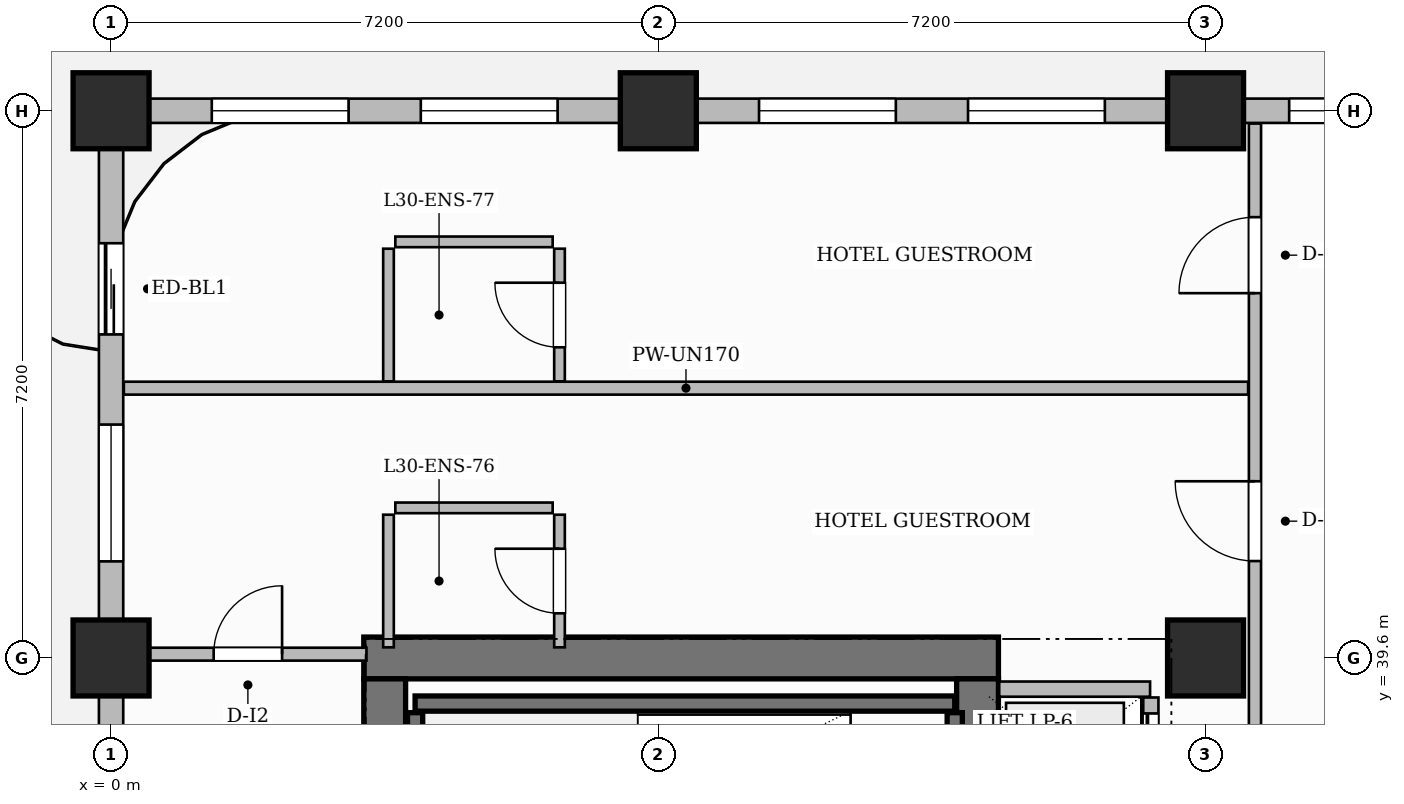
"""IFC4 building model, lengths in metres.
Left out: names, types, materials, properties, quantities, classifications, styles, units other than length and angle.
Written with IfcOpenShell. Run it as: python <this file> out.ifc"""

import sys

from ifc_helpers import new_model, si_unit, direction, frame, frame_2d, origin, origin_2d, place, context, subcontext, project, spatial, rectangle, extrude, source, transform, mapped, element, fill, save


model = new_model("IFC4")
c1 = context("Model", 3, precision=1e-05, world=origin(), true_north=direction((0.0, 1.0)))
c2 = subcontext(c1, "Body", "Model", "MODEL_VIEW")
j1 = project(units=[si_unit("LENGTHUNIT", "METRE"), si_unit("PLANEANGLEUNIT", "RADIAN")], contexts=[c1])
p1 = place(None, origin())
s1 = spatial("IfcSite", under=j1, at=p1, CompositionType="ELEMENT")
p2 = place(p1, origin())
s2 = spatial("IfcBuilding", under=s1, at=p2, CompositionType="ELEMENT")
p3 = place(p2, frame((0.0, 0.0, 122.9)))
s3 = spatial("IfcBuildingStorey", under=s2, at=p3, CompositionType="ELEMENT", Elevation=122.9)
p4 = place(p3, frame((3.325, 39.6, 0.0), z_axis=(0.0, 0.0, 1.0), x_axis=(1.0, 0.0, 0.0)))
e1 = element("IfcWall", 1, at=p4, inside=s3, PredefinedType="SHEAR", context=c2, shape_type="SweptSolid", body=[
    extrude(rectangle(XDim=8.35, YDim=0.55, at=frame_2d((4.175, 0.0))), origin(), (0.0, 0.0, 1.0), 3.7),
])
p5 = place(p3, frame((3.6, 25.475, 0.0), z_axis=(0.0, 0.0, 1.0), x_axis=(0.0, 1.0, 0.0)))
e2 = element("IfcWall", 2, at=p5, inside=s3, PredefinedType="SHEAR", context=c2, shape_type="SweptSolid", body=[
    extrude(rectangle(XDim=13.85, YDim=0.55, at=frame_2d((6.925, 0.0))), origin(), (0.0, 0.0, 1.0), 3.7),
])
p6 = place(p3, frame((11.4, 25.475, 0.0), z_axis=(0.0, 0.0, 1.0), x_axis=(0.0, 1.0, 0.0)))
e3 = element("IfcWall", 3, at=p6, inside=s3, PredefinedType="SHEAR", context=c2, shape_type="SweptSolid", body=[
    extrude(rectangle(XDim=13.85, YDim=0.55, at=frame_2d((6.925, 0.0))), origin(), (0.0, 0.0, 1.0), 3.7),
])
p7 = place(p6, frame((6.495, 0.0, 0.0)))
e4 = element("IfcOpeningElement", 4, at=p7, cuts=e3, PredefinedType="OPENING", context=c2, shape_type="SweptSolid", body=[
    extrude(rectangle(XDim=1.5, YDim=2.2, at=frame_2d((0.75, 1.1))), frame((0.0, 0.285, 0.0), z_axis=(0.0, -1.0, 0.0), x_axis=(1.0, 0.0, 0.0)), (0.0, 0.0, 1.0), 0.57),
])
m1 = source(origin(), c2, "Body", "SweptSolid", [
    extrude(rectangle(XDim=1.0, YDim=1.0, at=origin_2d()), origin(), (0.0, 0.0, 1.0), 3.7),
])
for number, where, z_axis, x_axis in (
    (5, (0.0, 39.6, 0.0), (0.0, 0.0, 1.0), (1.0, 0.0, 0.0)),
    (6, (0.0, 46.8, 0.0), (0.0, 0.0, 1.0), (1.0, 0.0, 0.0)),
    (7, (7.2, 46.8, 0.0), (0.0, 0.0, 1.0), (1.0, 0.0, 0.0)),
    (8, (14.4, 39.6, 0.0), (0.0, 0.0, 1.0), (1.0, 0.0, 0.0)),
    (9, (14.4, 46.8, 0.0), (0.0, 0.0, 1.0), (1.0, 0.0, 0.0)),
):
    element("IfcColumn", number, at=place(p3, frame(where, z_axis=z_axis, x_axis=x_axis)), inside=s3, PredefinedType="COLUMN", context=c2, shape_type="MappedRepresentation", body=[
        mapped(m1, transform((0.0, 0.0, 0.0), scale=1.0)),
    ])
p8 = place(p3, frame((4.0, 39.0, 0.0), z_axis=(0.0, 0.0, 1.0), x_axis=(1.0, 0.0, 0.0)))
e10 = element("IfcWall", 10, at=p8, inside=s3, PredefinedType="SHEAR", context=c2, shape_type="SweptSolid", body=[
    extrude(rectangle(XDim=7.1, YDim=0.2, at=frame_2d((3.55, 0.0))), origin(), (0.0, 0.0, 1.0), 3.7),
])
for number, where, z_axis, x_axis in (
    (11, (4.0, 36.18, 0.0), (0.0, 0.0, 1.0), (0.0, 1.0, 0.0)),
    (12, (11.1, 36.18, 0.0), (0.0, 0.0, 1.0), (0.0, 1.0, 0.0)),
):
    element("IfcWall", number, at=place(p3, frame(where, z_axis=z_axis, x_axis=x_axis)), inside=s3, PredefinedType="SHEAR", context=c2, shape_type="SweptSolid", body=[
        extrude(rectangle(XDim=2.7, YDim=0.2, at=frame_2d((1.35, 0.0))), origin(), (0.0, 0.0, 1.0), 3.7),
    ])
p9 = place(p3, frame((11.685, 39.19, 0.0), z_axis=(0.0, 0.0, 1.0), x_axis=(1.0, 0.0, 0.0)))
e13 = element("IfcWall", 13, at=p9, inside=s3, PredefinedType="PARTITIONING", context=c2, shape_type="SweptSolid", body=[
    extrude(rectangle(XDim=1.985, YDim=0.2, at=frame_2d((0.992, 0.0))), origin(), (0.0, 0.0, 1.0), 3.45),
])
p10 = place(p3, frame((13.68, 34.36, 0.0), z_axis=(0.0, 0.0, 1.0), x_axis=(0.0, 1.0, 0.0)))
e14 = element("IfcWall", 14, at=p10, inside=s3, PredefinedType="PARTITIONING", context=c2, shape_type="SweptSolid", body=[
    extrude(rectangle(XDim=4.72, YDim=0.2, at=frame_2d((2.36, 0.0))), origin(), (0.0, 0.0, 1.0), 3.45),
])
p11 = place(p10, frame((0.21, 0.0, 0.0)))
e15 = element("IfcOpeningElement", 15, at=p11, cuts=e14, PredefinedType="OPENING", context=c2, shape_type="SweptSolid", body=[
    extrude(rectangle(XDim=1.1, YDim=2.2, at=frame_2d((0.55, 1.1))), frame((0.0, 0.11, 0.0), z_axis=(0.0, -1.0, 0.0), x_axis=(1.0, 0.0, 0.0)), (0.0, 0.0, 1.0), 0.22),
])
p12 = place(p10, frame((1.81, 0.0, 0.0)))
e16 = element("IfcOpeningElement", 16, at=p12, cuts=e14, PredefinedType="OPENING", context=c2, shape_type="SweptSolid", body=[
    extrude(rectangle(XDim=1.1, YDim=2.2, at=frame_2d((0.55, 1.1))), frame((0.0, 0.11, 0.0), z_axis=(0.0, -1.0, 0.0), x_axis=(1.0, 0.0, 0.0)), (0.0, 0.0, 1.0), 0.22),
])
p13 = place(p10, frame((3.41, 0.0, 0.0)))
e17 = element("IfcOpeningElement", 17, at=p13, cuts=e14, PredefinedType="OPENING", context=c2, shape_type="SweptSolid", body=[
    extrude(rectangle(XDim=1.1, YDim=2.2, at=frame_2d((0.55, 1.1))), frame((0.0, 0.11, 0.0), z_axis=(0.0, -1.0, 0.0), x_axis=(1.0, 0.0, 0.0)), (0.0, 0.0, 1.0), 0.22),
])
p14 = place(p3, frame((0.24, 39.65, 0.0), z_axis=(0.0, 0.0, 1.0), x_axis=(1.0, 0.0, 0.0)))
e18 = element("IfcWall", 18, at=p14, inside=s3, PredefinedType="PARTITIONING", context=c2, shape_type="SweptSolid", body=[
    extrude(rectangle(XDim=3.12, YDim=0.17, at=frame_2d((1.56, 0.0))), origin(), (0.0, 0.0, 1.0), 3.45),
])
p15 = place(p14, frame((1.11, 0.0, 0.0)))
e19 = element("IfcOpeningElement", 19, at=p15, cuts=e18, PredefinedType="OPENING", context=c2, shape_type="SweptSolid", body=[
    extrude(rectangle(XDim=0.9, YDim=2.15, at=frame_2d((0.45, 1.075))), frame((0.0, 0.095, 0.0), z_axis=(0.0, -1.0, 0.0), x_axis=(1.0, 0.0, 0.0)), (0.0, 0.0, 1.0), 0.19),
])
p16 = place(p3, frame((15.05, 34.34, 0.0), z_axis=(0.0, 0.0, 1.0), x_axis=(0.0, 1.0, 0.0)))
e20 = element("IfcWall", 20, at=p16, inside=s3, PredefinedType="PARTITIONING", context=c2, shape_type="SweptSolid", body=[
    extrude(rectangle(XDim=12.292, YDim=0.16, at=frame_2d((6.146, 0.0))), origin(), (0.0, 0.0, 1.0), 3.45),
])
p17 = place(p16, frame((6.535, 0.0, 0.0)))
e21 = element("IfcOpeningElement", 21, at=p17, cuts=e20, PredefinedType="OPENING", context=c2, shape_type="SweptSolid", body=[
    extrude(rectangle(XDim=1.05, YDim=2.25, at=frame_2d((0.525, 1.125))), frame((0.0, 0.09, 0.0), z_axis=(0.0, -1.0, 0.0), x_axis=(1.0, 0.0, 0.0)), (0.0, 0.0, 1.0), 0.18),
])
p18 = place(p16, frame((10.06, 0.0, 0.0)))
e22 = element("IfcOpeningElement", 22, at=p18, cuts=e20, PredefinedType="OPENING", context=c2, shape_type="SweptSolid", body=[
    extrude(rectangle(XDim=1.0, YDim=2.2, at=frame_2d((0.5, 1.1))), frame((0.0, 0.09, 0.0), z_axis=(0.0, -1.0, 0.0), x_axis=(1.0, 0.0, 0.0)), (0.0, 0.0, 1.0), 0.18),
])
p19 = place(p3, frame((0.168, 43.15, 0.0), z_axis=(0.0, 0.0, 1.0), x_axis=(1.0, 0.0, 0.0)))
e23 = element("IfcWall", 23, at=p19, inside=s3, PredefinedType="PARTITIONING", context=c2, shape_type="SweptSolid", body=[
    extrude(rectangle(XDim=14.792, YDim=0.17, at=frame_2d((7.396, 0.0))), origin(), (0.0, 0.0, 1.0), 3.45),
])
p20 = place(p3, frame((3.65, 39.74, 0.0), z_axis=(0.0, 0.0, 1.0), x_axis=(0.0, 1.0, 0.0)))
e24 = element("IfcWall", 24, at=p20, inside=s3, PredefinedType="PARTITIONING", context=c2, shape_type="SweptSolid", body=[
    extrude(rectangle(XDim=1.745, YDim=0.14, at=frame_2d((0.873, 0.0))), origin(), (0.0, 0.0, 1.0), 3.45),
])
p21 = place(p3, frame((3.74, 41.575, 0.0), z_axis=(0.0, 0.0, 1.0), x_axis=(1.0, 0.0, 0.0)))
e25 = element("IfcWall", 25, at=p21, inside=s3, PredefinedType="PARTITIONING", context=c2, shape_type="SweptSolid", body=[
    extrude(rectangle(XDim=2.07, YDim=0.14, at=frame_2d((1.035, 0.0))), origin(), (0.0, 0.0, 1.0), 2.935),
])
p22 = place(p3, frame((5.9, 39.74, 0.0), z_axis=(0.0, 0.0, 1.0), x_axis=(0.0, 1.0, 0.0)))
e26 = element("IfcWall", 26, at=p22, inside=s3, PredefinedType="PARTITIONING", context=c2, shape_type="SweptSolid", body=[
    extrude(rectangle(XDim=1.745, YDim=0.14, at=frame_2d((0.873, 0.0))), origin(), (0.0, 0.0, 1.0), 3.45),
])
p23 = place(p22, frame((0.448, 0.0, 0.0)))
e27 = element("IfcOpeningElement", 27, at=p23, cuts=e26, PredefinedType="OPENING", context=c2, shape_type="SweptSolid", body=[
    extrude(rectangle(XDim=0.85, YDim=2.1, at=frame_2d((0.425, 1.05))), frame((0.0, 0.08, 0.0), z_axis=(0.0, -1.0, 0.0), x_axis=(1.0, 0.0, 0.0)), (0.0, 0.0, 1.0), 0.16),
])
p24 = place(p3, frame((3.65, 43.24, 0.0), z_axis=(0.0, 0.0, 1.0), x_axis=(0.0, 1.0, 0.0)))
e28 = element("IfcWall", 28, at=p24, inside=s3, PredefinedType="PARTITIONING", context=c2, shape_type="SweptSolid", body=[
    extrude(rectangle(XDim=1.745, YDim=0.14, at=frame_2d((0.873, 0.0))), origin(), (0.0, 0.0, 1.0), 3.45),
])
p25 = place(p3, frame((3.74, 45.075, 0.0), z_axis=(0.0, 0.0, 1.0), x_axis=(1.0, 0.0, 0.0)))
e29 = element("IfcWall", 29, at=p25, inside=s3, PredefinedType="PARTITIONING", context=c2, shape_type="SweptSolid", body=[
    extrude(rectangle(XDim=2.07, YDim=0.14, at=frame_2d((1.035, 0.0))), origin(), (0.0, 0.0, 1.0), 3.45),
])
p26 = place(p3, frame((5.9, 43.24, 0.0), z_axis=(0.0, 0.0, 1.0), x_axis=(0.0, 1.0, 0.0)))
e30 = element("IfcWall", 30, at=p26, inside=s3, PredefinedType="PARTITIONING", context=c2, shape_type="SweptSolid", body=[
    extrude(rectangle(XDim=1.745, YDim=0.14, at=frame_2d((0.873, 0.0))), origin(), (0.0, 0.0, 1.0), 3.45),
])
p27 = place(p26, frame((0.448, 0.0, 0.0)))
e31 = element("IfcOpeningElement", 31, at=p27, cuts=e30, PredefinedType="OPENING", context=c2, shape_type="SweptSolid", body=[
    extrude(rectangle(XDim=0.85, YDim=2.1, at=frame_2d((0.425, 1.05))), frame((0.0, 0.08, 0.0), z_axis=(0.0, -1.0, 0.0), x_axis=(1.0, 0.0, 0.0)), (0.0, 0.0, 1.0), 0.16),
])
p28 = place(p3, frame((0.0, 25.25, 0.0), z_axis=(0.0, 0.0, 1.0), x_axis=(0.0, 1.0, 0.0)))
e32 = element("IfcWall", 32, at=p28, inside=s3, PredefinedType="SOLIDWALL", context=c2, shape_type="SweptSolid", body=[
    extrude(rectangle(XDim=21.5, YDim=0.32, at=frame_2d((10.75, 0.0))), origin(), (0.0, 0.0, 1.0), 2.935),
])
p29 = place(p28, frame((18.607, 0.0, 0.0)))
e33 = element("IfcOpeningElement", 33, at=p29, cuts=e32, PredefinedType="OPENING", context=c2, shape_type="SweptSolid", body=[
    extrude(rectangle(XDim=1.2, YDim=2.2, at=frame_2d((0.6, 1.1))), frame((0.0, 0.17, 0.0), z_axis=(0.0, -1.0, 0.0), x_axis=(1.0, 0.0, 0.0)), (0.0, 0.0, 1.0), 0.34),
])
p30 = place(p28, frame((0.8, 0.0, 0.0)))
e34 = element("IfcOpeningElement", 34, at=p30, cuts=e32, PredefinedType="OPENING", context=c2, shape_type="SweptSolid", body=[
    extrude(rectangle(XDim=1.2, YDim=2.2, at=frame_2d((0.6, 1.1))), frame((0.0, 0.17, 0.0), z_axis=(0.0, -1.0, 0.0), x_axis=(1.0, 0.0, 0.0)), (0.0, 0.0, 1.0), 0.34),
])
p31 = place(p28, frame((3.425, 0.0, 0.8)))
e35 = element("IfcOpeningElement", 35, at=p31, cuts=e32, PredefinedType="OPENING", context=c2, shape_type="SweptSolid", body=[
    extrude(rectangle(XDim=1.8, YDim=1.85, at=frame_2d((0.9, 0.925))), frame((0.0, 0.17, 0.0), z_axis=(0.0, -1.0, 0.0), x_axis=(1.0, 0.0, 0.0)), (0.0, 0.0, 1.0), 0.34),
])
p32 = place(p28, frame((8.475, 0.0, 0.8)))
e36 = element("IfcOpeningElement", 36, at=p32, cuts=e32, PredefinedType="OPENING", context=c2, shape_type="SweptSolid", body=[
    extrude(rectangle(XDim=1.8, YDim=1.85, at=frame_2d((0.9, 0.925))), frame((0.0, 0.17, 0.0), z_axis=(0.0, -1.0, 0.0), x_axis=(1.0, 0.0, 0.0)), (0.0, 0.0, 1.0), 0.34),
])
p33 = place(p28, frame((11.225, 0.0, 0.8)))
e37 = element("IfcOpeningElement", 37, at=p33, cuts=e32, PredefinedType="OPENING", context=c2, shape_type="SweptSolid", body=[
    extrude(rectangle(XDim=1.8, YDim=1.85, at=frame_2d((0.9, 0.925))), frame((0.0, 0.17, 0.0), z_axis=(0.0, -1.0, 0.0), x_axis=(1.0, 0.0, 0.0)), (0.0, 0.0, 1.0), 0.34),
])
p34 = place(p28, frame((15.621, 0.0, 0.8)))
e38 = element("IfcOpeningElement", 38, at=p34, cuts=e32, PredefinedType="OPENING", context=c2, shape_type="SweptSolid", body=[
    extrude(rectangle(XDim=1.8, YDim=1.85, at=frame_2d((0.9, 0.925))), frame((0.0, 0.17, 0.0), z_axis=(0.0, -1.0, 0.0), x_axis=(1.0, 0.0, 0.0)), (0.0, 0.0, 1.0), 0.34),
])
p35 = place(p3, frame((0.0, 46.8, 0.0), z_axis=(0.0, 0.0, 1.0), x_axis=(1.0, 0.0, 0.0)))
e39 = element("IfcWall", 39, at=p35, inside=s3, PredefinedType="SOLIDWALL", context=c2, shape_type="SweptSolid", body=[
    extrude(rectangle(XDim=18.0, YDim=0.32, at=frame_2d((9.0, 0.0))), origin(), (0.0, 0.0, 1.0), 2.935),
])
p36 = place(p35, frame((1.325, 0.0, 0.8)))
e40 = element("IfcOpeningElement", 40, at=p36, cuts=e39, PredefinedType="OPENING", context=c2, shape_type="SweptSolid", body=[
    extrude(rectangle(XDim=1.8, YDim=1.85, at=frame_2d((0.9, 0.925))), frame((0.0, 0.17, 0.0), z_axis=(0.0, -1.0, 0.0), x_axis=(1.0, 0.0, 0.0)), (0.0, 0.0, 1.0), 0.34),
])
p37 = place(p35, frame((4.075, 0.0, 0.8)))
e41 = element("IfcOpeningElement", 41, at=p37, cuts=e39, PredefinedType="OPENING", context=c2, shape_type="SweptSolid", body=[
    extrude(rectangle(XDim=1.8, YDim=1.85, at=frame_2d((0.9, 0.925))), frame((0.0, 0.17, 0.0), z_axis=(0.0, -1.0, 0.0), x_axis=(1.0, 0.0, 0.0)), (0.0, 0.0, 1.0), 0.34),
])
p38 = place(p35, frame((8.525, 0.0, 0.8)))
e42 = element("IfcOpeningElement", 42, at=p38, cuts=e39, PredefinedType="OPENING", context=c2, shape_type="SweptSolid", body=[
    extrude(rectangle(XDim=1.8, YDim=1.85, at=frame_2d((0.9, 0.925))), frame((0.0, 0.17, 0.0), z_axis=(0.0, -1.0, 0.0), x_axis=(1.0, 0.0, 0.0)), (0.0, 0.0, 1.0), 0.34),
])
p39 = place(p35, frame((11.275, 0.0, 0.8)))
e43 = element("IfcOpeningElement", 43, at=p39, cuts=e39, PredefinedType="OPENING", context=c2, shape_type="SweptSolid", body=[
    extrude(rectangle(XDim=1.8, YDim=1.85, at=frame_2d((0.9, 0.925))), frame((0.0, 0.17, 0.0), z_axis=(0.0, -1.0, 0.0), x_axis=(1.0, 0.0, 0.0)), (0.0, 0.0, 1.0), 0.34),
])
p40 = place(p35, frame((15.5, 0.0, 0.8)))
e44 = element("IfcOpeningElement", 44, at=p40, cuts=e39, PredefinedType="OPENING", context=c2, shape_type="SweptSolid", body=[
    extrude(rectangle(XDim=1.4, YDim=1.85, at=frame_2d((0.7, 0.925))), frame((0.0, 0.17, 0.0), z_axis=(0.0, -1.0, 0.0), x_axis=(1.0, 0.0, 0.0)), (0.0, 0.0, 1.0), 0.34),
])
m2 = source(origin(), c2, "Body", "SweptSolid", [
    extrude(rectangle(XDim=0.9, YDim=2.15, at=frame_2d((0.45, 1.075))), frame((0.0, 0.025, 0.0), z_axis=(0.0, -1.0, 0.0), x_axis=(1.0, 0.0, 0.0)), (0.0, 0.0, 1.0), 0.05),
])
p41 = place(p15, origin())
e45 = element("IfcDoor", 45, at=p41, inside=s3, OperationType="SINGLE_SWING_RIGHT", PredefinedType="DOOR", context=c2, shape_type="MappedRepresentation", body=[
    mapped(m2, transform((0.0, 0.0, 0.0), scale=1.0)),
])
fill(e19, e45)
m3 = source(origin(), c2, "Body", "SweptSolid", [
    extrude(rectangle(XDim=0.85, YDim=2.1, at=frame_2d((0.425, 1.05))), frame((0.0, 0.025, 0.0), z_axis=(0.0, -1.0, 0.0), x_axis=(1.0, 0.0, 0.0)), (0.0, 0.0, 1.0), 0.05),
])
p42 = place(p23, origin())
e46 = element("IfcDoor", 46, at=p42, inside=s3, OperationType="SINGLE_SWING_RIGHT", PredefinedType="DOOR", context=c2, shape_type="MappedRepresentation", body=[
    mapped(m3, transform((0.0, 0.0, 0.0), scale=1.0)),
])
fill(e27, e46)
m4 = source(origin(), c2, "Body", "SweptSolid", [
    extrude(rectangle(XDim=1.05, YDim=2.25, at=frame_2d((0.525, 1.125))), frame((0.0, 0.025, 0.0), z_axis=(0.0, -1.0, 0.0), x_axis=(1.0, 0.0, 0.0)), (0.0, 0.0, 1.0), 0.05),
])
p43 = place(p17, origin())
e47 = element("IfcDoor", 47, at=p43, inside=s3, OperationType="SINGLE_SWING_RIGHT", PredefinedType="DOOR", context=c2, shape_type="MappedRepresentation", body=[
    mapped(m4, transform((0.0, 0.0, 0.0), scale=1.0)),
])
fill(e21, e47)
p44 = place(p27, origin())
e48 = element("IfcDoor", 48, at=p44, inside=s3, OperationType="SINGLE_SWING_RIGHT", PredefinedType="DOOR", context=c2, shape_type="MappedRepresentation", body=[
    mapped(m3, transform((0.0, 0.0, 0.0), scale=1.0)),
])
fill(e31, e48)
m5 = source(origin(), c2, "Body", "SweptSolid", [
    extrude(rectangle(XDim=1.0, YDim=2.2, at=frame_2d((0.5, 1.1))), frame((0.0, 0.025, 0.0), z_axis=(0.0, -1.0, 0.0), x_axis=(1.0, 0.0, 0.0)), (0.0, 0.0, 1.0), 0.05),
])
p45 = place(p18, origin())
e49 = element("IfcDoor", 49, at=p45, inside=s3, OperationType="SINGLE_SWING_LEFT", PredefinedType="DOOR", context=c2, shape_type="MappedRepresentation", body=[
    mapped(m5, transform((0.0, 0.0, 0.0), scale=1.0)),
])
fill(e22, e49)
m6 = source(origin(), c2, "Body", "SweptSolid", [
    extrude(rectangle(XDim=1.1, YDim=2.2, at=frame_2d((0.55, 1.1))), frame((0.0, 0.025, 0.0), z_axis=(0.0, -1.0, 0.0), x_axis=(1.0, 0.0, 0.0)), (0.0, 0.0, 1.0), 0.05),
])
p46 = place(p13, origin())
e50 = element("IfcDoor", 50, at=p46, inside=s3, OperationType="SLIDING_TO_LEFT", PredefinedType="DOOR", context=c2, shape_type="MappedRepresentation", body=[
    mapped(m6, transform((0.0, 0.0, 0.0), scale=1.0)),
])
fill(e17, e50)
m7 = source(origin(), c2, "Body", "SweptSolid", [
    extrude(rectangle(XDim=1.2, YDim=2.2, at=frame_2d((0.6, 1.1))), frame((0.0, 0.025, 0.0), z_axis=(0.0, -1.0, 0.0), x_axis=(1.0, 0.0, 0.0)), (0.0, 0.0, 1.0), 0.05),
])
p47 = place(p29, origin())
e51 = element("IfcDoor", 51, at=p47, inside=s3, OperationType="SLIDING_TO_LEFT", PredefinedType="DOOR", context=c2, shape_type="MappedRepresentation", body=[
    mapped(m7, transform((0.0, 0.0, 0.0), scale=1.0)),
])
fill(e33, e51)
m8 = source(origin(), c2, "Body", "SweptSolid", [
    extrude(rectangle(XDim=1.8, YDim=1.85, at=frame_2d((0.9, 0.925))), frame((0.0, 0.03, 0.0), z_axis=(0.0, -1.0, 0.0), x_axis=(1.0, 0.0, 0.0)), (0.0, 0.0, 1.0), 0.06),
])
p48 = place(p34, origin())
e52 = element("IfcWindow", 52, at=p48, inside=s3, PartitioningType="DOUBLE_PANEL_VERTICAL", PredefinedType="WINDOW", context=c2, shape_type="MappedRepresentation", body=[
    mapped(m8, transform((0.0, 0.0, 0.0), scale=1.0)),
])
fill(e38, e52)
p49 = place(p36, origin())
e53 = element("IfcWindow", 53, at=p49, inside=s3, PartitioningType="DOUBLE_PANEL_VERTICAL", PredefinedType="WINDOW", context=c2, shape_type="MappedRepresentation", body=[
    mapped(m8, transform((0.0, 0.0, 0.0), scale=1.0)),
])
fill(e40, e53)
p50 = place(p37, origin())
e54 = element("IfcWindow", 54, at=p50, inside=s3, PartitioningType="DOUBLE_PANEL_VERTICAL", PredefinedType="WINDOW", context=c2, shape_type="MappedRepresentation", body=[
    mapped(m8, transform((0.0, 0.0, 0.0), scale=1.0)),
])
fill(e41, e54)
p51 = place(p38, origin())
e55 = element("IfcWindow", 55, at=p51, inside=s3, PartitioningType="DOUBLE_PANEL_VERTICAL", PredefinedType="WINDOW", context=c2, shape_type="MappedRepresentation", body=[
    mapped(m8, transform((0.0, 0.0, 0.0), scale=1.0)),
])
fill(e42, e55)
p52 = place(p39, origin())
e56 = element("IfcWindow", 56, at=p52, inside=s3, PartitioningType="DOUBLE_PANEL_VERTICAL", PredefinedType="WINDOW", context=c2, shape_type="MappedRepresentation", body=[
    mapped(m8, transform((0.0, 0.0, 0.0), scale=1.0)),
])
fill(e43, e56)
m9 = source(origin(), c2, "Body", "SweptSolid", [
    extrude(rectangle(XDim=1.4, YDim=1.85, at=frame_2d((0.7, 0.925))), frame((0.0, 0.03, 0.0), z_axis=(0.0, -1.0, 0.0), x_axis=(1.0, 0.0, 0.0)), (0.0, 0.0, 1.0), 0.06),
])
p53 = place(p40, origin())
e57 = element("IfcWindow", 57, at=p53, inside=s3, PartitioningType="SINGLE_PANEL", PredefinedType="WINDOW", context=c2, shape_type="MappedRepresentation", body=[
    mapped(m9, transform((0.0, 0.0, 0.0), scale=1.0)),
])
fill(e44, e57)
save(model, sys.argv[1])
